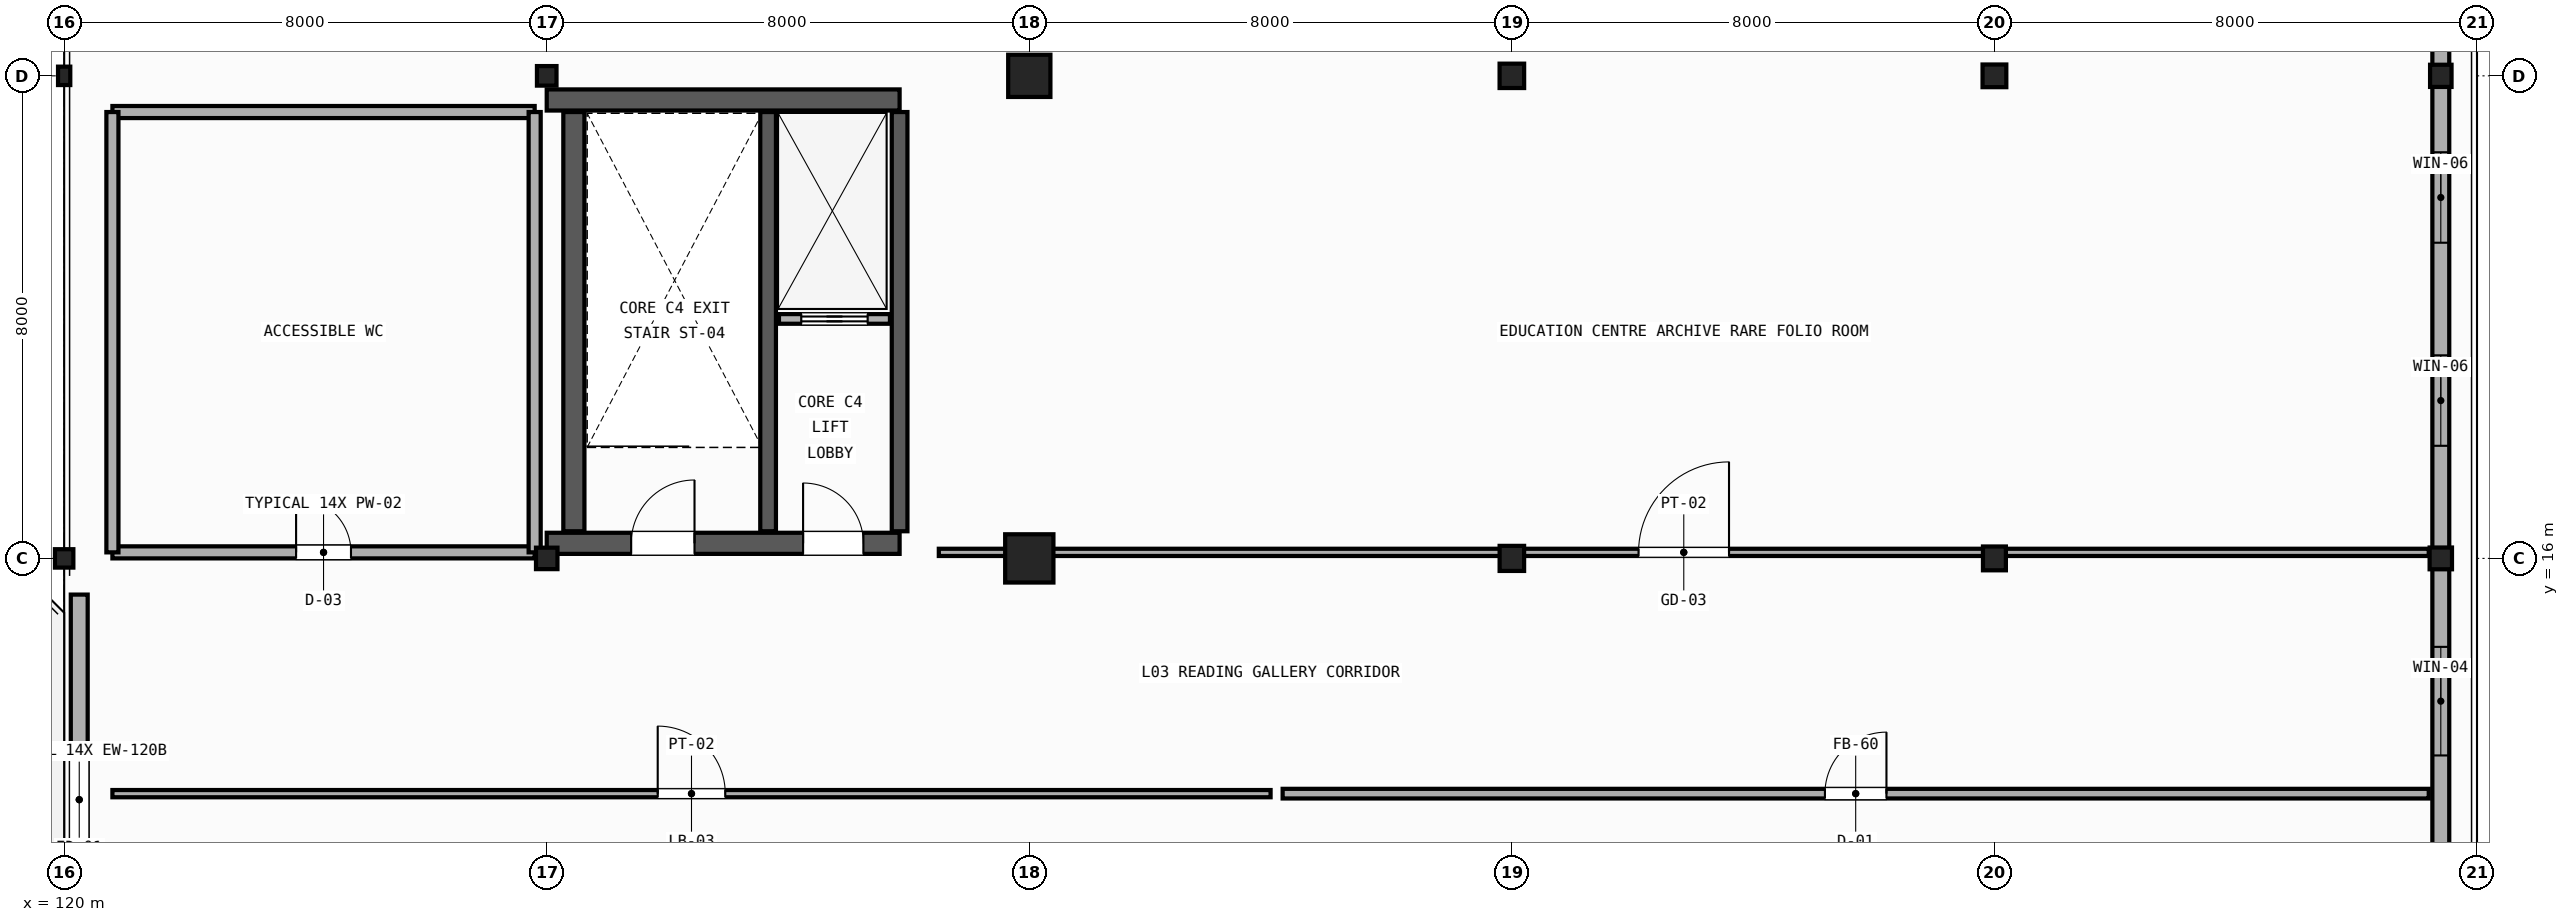
"""IFC4 building model, lengths in metres.
Left out: names, types, materials, properties, quantities, classifications, styles, units other than length and angle.
Written with IfcOpenShell. Run it as: python <this file> out.ifc"""

import sys

from ifc_helpers import new_model, si_unit, direction, frame, frame_2d, origin, origin_2d, place, context, subcontext, project, spatial, rectangle, hollow_rectangle, hollow_circle, i_section, extrude, element, fill, save


model = new_model("IFC4")
c1 = context("Model", 3, precision=1e-05, world=origin(), true_north=direction((0.0, 1.0)))
c2 = subcontext(c1, "Body", "Model", "MODEL_VIEW")
j1 = project(units=[si_unit("LENGTHUNIT", "METRE"), si_unit("PLANEANGLEUNIT", "RADIAN")], contexts=[c1])
p1 = place(None, origin())
s1 = spatial("IfcSite", under=j1, at=p1, CompositionType="ELEMENT")
p2 = place(p1, origin())
s2 = spatial("IfcBuilding", under=s1, at=p2, CompositionType="ELEMENT")
p3 = place(p2, frame((0.0, 0.0, 15.0)))
s3 = spatial("IfcBuildingStorey", under=s2, at=p3, CompositionType="ELEMENT", Elevation=15.0)
p4 = place(p3, frame((120.0, 16.0, 0.0), z_axis=(0.0, 0.0, 1.0), x_axis=(0.0, 1.0, 0.0)))
e1 = element("IfcColumn", 1, at=p4, inside=s3, PredefinedType="COLUMN", context=c2, shape_type="SweptSolid", body=[
    extrude(hollow_rectangle(XDim=0.305, YDim=0.305, WallThickness=0.012, InnerFilletRadius=0.012, OuterFilletRadius=0.024, at=origin_2d()), origin(), (0.0, 0.0, 1.0), 4.8),
])
p5 = place(p3, frame((120.0, 24.0, 0.0), z_axis=(0.0, 0.0, 1.0), x_axis=(1.0, 0.0, 0.0)))
e2 = element("IfcColumn", 2, at=p5, inside=s3, PredefinedType="COLUMN", context=c2, shape_type="SweptSolid", body=[
    extrude(hollow_rectangle(XDim=0.203, YDim=0.305, WallThickness=0.009, InnerFilletRadius=0.009, OuterFilletRadius=0.018, at=origin_2d()), origin(), (0.0, 0.0, 1.0), 4.8),
])
p6 = place(p3, frame((128.0, 16.0, 0.0), z_axis=(0.0, 0.0, 1.0), x_axis=(1.0, 0.0, 0.0)))
e3 = element("IfcColumn", 3, at=p6, inside=s3, PredefinedType="COLUMN", context=c2, shape_type="SweptSolid", body=[
    extrude(hollow_circle(Radius=0.178, WallThickness=0.012, at=origin_2d()), origin(), (0.0, 0.0, 1.0), 7.5),
])
p7 = place(p3, frame((128.0, 24.0, 0.0), z_axis=(0.0, 0.0, 1.0), x_axis=(0.0, 1.0, 0.0)))
e4 = element("IfcColumn", 4, at=p7, inside=s3, PredefinedType="COLUMN", context=c2, shape_type="SweptSolid", body=[
    extrude(hollow_circle(Radius=0.162, WallThickness=0.012, at=origin_2d()), origin(), (0.0, 0.0, 1.0), 4.8),
])
p8 = place(p3, frame((136.0, 16.0, 0.0), z_axis=(0.0, 0.0, 1.0), x_axis=(0.0, 1.0, 0.0)))
e5 = element("IfcColumn", 5, at=p8, inside=s3, PredefinedType="COLUMN", context=c2, shape_type="SweptSolid", body=[
    extrude(rectangle(XDim=0.8, YDim=0.8, at=origin_2d()), origin(), (0.0, 0.0, 1.0), 7.5),
])
p9 = place(p3, frame((136.0, 24.0, 0.0), z_axis=(0.0, 0.0, 1.0), x_axis=(1.0, 0.0, 0.0)))
e6 = element("IfcColumn", 6, at=p9, inside=s3, PredefinedType="COLUMN", context=c2, shape_type="SweptSolid", body=[
    extrude(rectangle(XDim=0.7, YDim=0.7, at=origin_2d()), origin(), (0.0, 0.0, 1.0), 4.8),
])
p10 = place(p3, frame((144.0, 16.0, 0.0), z_axis=(0.0, 0.0, 1.0), x_axis=(1.0, 0.0, 0.0)))
e7 = element("IfcColumn", 7, at=p10, inside=s3, PredefinedType="COLUMN", context=c2, shape_type="SweptSolid", body=[
    extrude(i_section(OverallWidth=0.406, OverallDepth=0.416, WebThickness=0.03, FlangeThickness=0.048, FilletRadius=0.015, at=origin_2d()), origin(), (0.0, 0.0, 1.0), 7.5),
])
p11 = place(p3, frame((144.0, 24.0, 0.0), z_axis=(0.0, 0.0, 1.0), x_axis=(0.0, 1.0, 0.0)))
e8 = element("IfcColumn", 8, at=p11, inside=s3, PredefinedType="COLUMN", context=c2, shape_type="SweptSolid", body=[
    extrude(i_section(OverallWidth=0.404, OverallDepth=0.407, WebThickness=0.027, FlangeThickness=0.044, FilletRadius=0.015, at=origin_2d()), origin(), (0.0, 0.0, 1.0), 4.8),
])
p12 = place(p3, frame((152.0, 16.0, 0.0), z_axis=(0.0, 0.0, 1.0), x_axis=(0.0, 1.0, 0.0)))
e9 = element("IfcColumn", 9, at=p12, inside=s3, PredefinedType="COLUMN", context=c2, shape_type="SweptSolid", body=[
    extrude(i_section(OverallWidth=0.395, OverallDepth=0.38, WebThickness=0.019, FlangeThickness=0.03, FilletRadius=0.015, at=origin_2d()), origin(), (0.0, 0.0, 1.0), 4.8),
])
p13 = place(p3, frame((152.0, 24.0, 0.0), z_axis=(0.0, 0.0, 1.0), x_axis=(1.0, 0.0, 0.0)))
e10 = element("IfcColumn", 10, at=p13, inside=s3, PredefinedType="COLUMN", context=c2, shape_type="SweptSolid", body=[
    extrude(i_section(OverallWidth=0.394, OverallDepth=0.376, WebThickness=0.017, FlangeThickness=0.028, FilletRadius=0.015, at=origin_2d()), origin(), (0.0, 0.0, 1.0), 4.8),
])
p14 = place(p3, frame((159.4, 16.0, 0.0), z_axis=(0.0, 0.0, 1.0), x_axis=(1.0, 0.0, 0.0)))
e11 = element("IfcColumn", 11, at=p14, inside=s3, PredefinedType="COLUMN", context=c2, shape_type="SweptSolid", body=[
    extrude(i_section(OverallWidth=0.371, OverallDepth=0.361, WebThickness=0.012, FlangeThickness=0.02, FilletRadius=0.015, at=origin_2d()), origin(), (0.0, 0.0, 1.0), 4.8),
])
p15 = place(p3, frame((159.4, 24.0, 0.0), z_axis=(0.0, 0.0, 1.0), x_axis=(0.0, 1.0, 0.0)))
e12 = element("IfcColumn", 12, at=p15, inside=s3, PredefinedType="COLUMN", context=c2, shape_type="SweptSolid", body=[
    extrude(i_section(OverallWidth=0.368, OverallDepth=0.356, WebThickness=0.011, FlangeThickness=0.018, FilletRadius=0.015, at=origin_2d()), origin(), (0.0, 0.0, 1.0), 4.8),
])
p16 = place(p3, frame((120.25, 8.6, 0.0), z_axis=(0.0, 0.0, 1.0), x_axis=(0.0, 1.0, 0.0)))
e13 = element("IfcWall", 13, at=p16, inside=s3, PredefinedType="STANDARD", context=c2, shape_type="SweptSolid", body=[
    extrude(rectangle(XDim=6.8, YDim=0.28, at=frame_2d((3.4, 0.0))), origin(), (0.0, 0.0, 1.0), 4.4),
])
p17 = place(p16, frame((2.6, 0.0, 0.0)))
e14 = element("IfcOpeningElement", 14, at=p17, cuts=e13, PredefinedType="OPENING", context=c2, shape_type="SweptSolid", body=[
    extrude(rectangle(XDim=1.6, YDim=2.25, at=frame_2d((0.8, 1.125))), frame((0.0, 0.15, 0.0), z_axis=(0.0, -1.0, 0.0), x_axis=(1.0, 0.0, 0.0)), (0.0, 0.0, 1.0), 0.3),
])
p18 = place(p3, frame((159.4, 8.0, 0.0), z_axis=(0.0, 0.0, 1.0), x_axis=(0.0, 1.0, 0.0)))
e15 = element("IfcWall", 15, at=p18, inside=s3, PredefinedType="STANDARD", context=c2, shape_type="SweptSolid", body=[
    extrude(rectangle(XDim=8.0, YDim=0.28, at=frame_2d((4.0, 0.0))), origin(), (0.0, 0.0, 1.0), 4.5),
])
p19 = place(p18, frame((1.467, 0.0, 0.9)))
e16 = element("IfcOpeningElement", 16, at=p19, cuts=e15, PredefinedType="OPENING", context=c2, shape_type="SweptSolid", body=[
    extrude(rectangle(XDim=1.8, YDim=2.5, at=frame_2d((0.9, 1.25))), frame((0.0, 0.15, 0.0), z_axis=(0.0, -1.0, 0.0), x_axis=(1.0, 0.0, 0.0)), (0.0, 0.0, 1.0), 0.3),
])
p20 = place(p18, frame((4.733, 0.0, 0.9)))
e17 = element("IfcOpeningElement", 17, at=p20, cuts=e15, PredefinedType="OPENING", context=c2, shape_type="SweptSolid", body=[
    extrude(rectangle(XDim=1.8, YDim=2.5, at=frame_2d((0.9, 1.25))), frame((0.0, 0.15, 0.0), z_axis=(0.0, -1.0, 0.0), x_axis=(1.0, 0.0, 0.0)), (0.0, 0.0, 1.0), 0.3),
])
p21 = place(p3, frame((159.4, 16.0, 0.0), z_axis=(0.0, 0.0, 1.0), x_axis=(0.0, 1.0, 0.0)))
e18 = element("IfcWall", 18, at=p21, inside=s3, PredefinedType="STANDARD", context=c2, shape_type="SweptSolid", body=[
    extrude(rectangle(XDim=8.6, YDim=0.28, at=frame_2d((4.3, 0.0))), origin(), (0.0, 0.0, 1.0), 4.047),
])
p22 = place(p21, frame((1.867, 0.0, 0.95)))
e19 = element("IfcOpeningElement", 19, at=p22, cuts=e18, PredefinedType="OPENING", context=c2, shape_type="SweptSolid", body=[
    extrude(rectangle(XDim=1.5, YDim=2.2, at=frame_2d((0.75, 1.1))), frame((0.0, 0.15, 0.0), z_axis=(0.0, -1.0, 0.0), x_axis=(1.0, 0.0, 0.0)), (0.0, 0.0, 1.0), 0.3),
])
p23 = place(p21, frame((5.233, 0.0, 0.95)))
e20 = element("IfcOpeningElement", 20, at=p23, cuts=e18, PredefinedType="OPENING", context=c2, shape_type="SweptSolid", body=[
    extrude(rectangle(XDim=1.5, YDim=2.2, at=frame_2d((0.75, 1.1))), frame((0.0, 0.15, 0.0), z_axis=(0.0, -1.0, 0.0), x_axis=(1.0, 0.0, 0.0)), (0.0, 0.0, 1.0), 0.3),
])
p24 = place(p3, frame((128.0, 16.25, 0.0), z_axis=(0.0, 0.0, 1.0), x_axis=(1.0, 0.0, 0.0)))
e21 = element("IfcWall", 21, at=p24, inside=s3, PredefinedType="SHEAR", context=c2, shape_type="SweptSolid", body=[
    extrude(rectangle(XDim=5.85, YDim=0.35, at=frame_2d((2.925, 0.0))), origin(), (0.0, 0.0, 1.0), 4.3),
])
p25 = place(p24, frame((1.4, 0.0, 0.0)))
e22 = element("IfcOpeningElement", 22, at=p25, cuts=e21, PredefinedType="OPENING", context=c2, shape_type="SweptSolid", body=[
    extrude(rectangle(XDim=1.05, YDim=2.1, at=frame_2d((0.525, 1.05))), frame((0.0, 0.185, 0.0), z_axis=(0.0, -1.0, 0.0), x_axis=(1.0, 0.0, 0.0)), (0.0, 0.0, 1.0), 0.37),
])
p26 = place(p24, frame((4.25, 0.0, 0.0)))
e23 = element("IfcOpeningElement", 23, at=p26, cuts=e21, PredefinedType="OPENING", context=c2, shape_type="SweptSolid", body=[
    extrude(rectangle(XDim=1.0, YDim=2.15, at=frame_2d((0.5, 1.075))), frame((0.0, 0.185, 0.0), z_axis=(0.0, -1.0, 0.0), x_axis=(1.0, 0.0, 0.0)), (0.0, 0.0, 1.0), 0.37),
])
p27 = place(p3, frame((128.0, 23.6, 0.0), z_axis=(0.0, 0.0, 1.0), x_axis=(1.0, 0.0, 0.0)))
e24 = element("IfcWall", 24, at=p27, inside=s3, PredefinedType="SHEAR", context=c2, shape_type="SweptSolid", body=[
    extrude(rectangle(XDim=5.85, YDim=0.35, at=frame_2d((2.925, 0.0))), origin(), (0.0, 0.0, 1.0), 4.3),
])
p28 = place(p3, frame((128.45, 16.45, 0.0), z_axis=(0.0, 0.0, 1.0), x_axis=(0.0, 1.0, 0.0)))
e25 = element("IfcWall", 25, at=p28, inside=s3, PredefinedType="SHEAR", context=c2, shape_type="SweptSolid", body=[
    extrude(rectangle(XDim=6.95, YDim=0.35, at=frame_2d((3.475, 0.0))), origin(), (0.0, 0.0, 1.0), 4.3),
])
for number, where, z_axis, x_axis in (
    (26, (133.85, 16.45, 0.0), (0.0, 0.0, 1.0), (0.0, 1.0, 0.0)),
    (27, (131.67, 16.45, 0.0), (0.0, 0.0, 1.0), (0.0, 1.0, 0.0)),
):
    element("IfcWall", number, at=place(p3, frame(where, z_axis=z_axis, x_axis=x_axis)), inside=s3, PredefinedType="SHEAR", context=c2, shape_type="SweptSolid", body=[
        extrude(rectangle(XDim=6.95, YDim=0.26, at=frame_2d((3.475, 0.0))), origin(), (0.0, 0.0, 1.0), 4.3),
    ])
p29 = place(p3, frame((131.85, 19.97, 0.0), z_axis=(0.0, 0.0, 1.0), x_axis=(1.0, 0.0, 0.0)))
e28 = element("IfcWall", 28, at=p29, inside=s3, PredefinedType="PARTITIONING", context=c2, shape_type="SweptSolid", body=[
    extrude(rectangle(XDim=1.84, YDim=0.16, at=frame_2d((0.92, 0.0))), origin(), (0.0, 0.0, 1.0), 3.6),
])
p30 = place(p29, frame((0.37, 0.0, 0.0)))
e29 = element("IfcOpeningElement", 29, at=p30, cuts=e28, PredefinedType="OPENING", context=c2, shape_type="SweptSolid", body=[
    extrude(rectangle(XDim=1.1, YDim=2.15, at=frame_2d((0.55, 1.075))), frame((0.0, 0.09, 0.0), z_axis=(0.0, -1.0, 0.0), x_axis=(1.0, 0.0, 0.0)), (0.0, 0.0, 1.0), 0.18),
])
p31 = place(p3, frame((120.8, 12.1, 0.0), z_axis=(0.0, 0.0, 1.0), x_axis=(1.0, 0.0, 0.0)))
e30 = element("IfcWall", 30, at=p31, inside=s3, PredefinedType="PARTITIONING", context=c2, shape_type="SweptSolid", body=[
    extrude(rectangle(XDim=19.2, YDim=0.12, at=frame_2d((9.6, 0.0))), origin(), (0.0, 0.0, 1.0), 4.29),
])
p32 = place(p31, frame((9.04, 0.0, 0.0)))
e31 = element("IfcOpeningElement", 31, at=p32, cuts=e30, PredefinedType="OPENING", context=c2, shape_type="SweptSolid", body=[
    extrude(rectangle(XDim=1.12, YDim=2.15, at=frame_2d((0.56, 1.075))), frame((0.0, 0.07, 0.0), z_axis=(0.0, -1.0, 0.0), x_axis=(1.0, 0.0, 0.0)), (0.0, 0.0, 1.0), 0.14),
])
p33 = place(p3, frame((140.2, 12.1, 0.0), z_axis=(0.0, 0.0, 1.0), x_axis=(1.0, 0.0, 0.0)))
e32 = element("IfcWall", 32, at=p33, inside=s3, PredefinedType="PARTITIONING", context=c2, shape_type="SweptSolid", body=[
    extrude(rectangle(XDim=19.0, YDim=0.16, at=frame_2d((9.5, 0.0))), origin(), (0.0, 0.0, 1.0), 4.29),
])
p34 = place(p33, frame((8.99, 0.0, 0.0)))
e33 = element("IfcOpeningElement", 33, at=p34, cuts=e32, PredefinedType="OPENING", context=c2, shape_type="SweptSolid", body=[
    extrude(rectangle(XDim=1.02, YDim=2.15, at=frame_2d((0.51, 1.075))), frame((0.0, 0.09, 0.0), z_axis=(0.0, -1.0, 0.0), x_axis=(1.0, 0.0, 0.0)), (0.0, 0.0, 1.0), 0.18),
])
p35 = place(p3, frame((120.8, 16.1, 0.0), z_axis=(0.0, 0.0, 1.0), x_axis=(1.0, 0.0, 0.0)))
e34 = element("IfcWall", 34, at=p35, inside=s3, PredefinedType="PLUMBINGWALL", context=c2, shape_type="SweptSolid", body=[
    extrude(rectangle(XDim=7.0, YDim=0.2, at=frame_2d((3.5, 0.0))), origin(), (0.0, 0.0, 1.0), 4.29),
])
p36 = place(p35, frame((3.045, 0.0, 0.0)))
e35 = element("IfcOpeningElement", 35, at=p36, cuts=e34, PredefinedType="OPENING", context=c2, shape_type="SweptSolid", body=[
    extrude(rectangle(XDim=0.91, YDim=2.1, at=frame_2d((0.455, 1.05))), frame((0.0, 0.11, 0.0), z_axis=(0.0, -1.0, 0.0), x_axis=(1.0, 0.0, 0.0)), (0.0, 0.0, 1.0), 0.22),
])
p37 = place(p3, frame((120.8, 23.4, 0.0), z_axis=(0.0, 0.0, 1.0), x_axis=(1.0, 0.0, 0.0)))
e36 = element("IfcWall", 36, at=p37, inside=s3, PredefinedType="PLUMBINGWALL", context=c2, shape_type="SweptSolid", body=[
    extrude(rectangle(XDim=7.0, YDim=0.2, at=frame_2d((3.5, 0.0))), origin(), (0.0, 0.0, 1.0), 4.29),
])
for number, where, z_axis, x_axis in (
    (37, (120.8, 16.1, 0.0), (0.0, 0.0, 1.0), (0.0, 1.0, 0.0)),
    (38, (127.8, 16.1, 0.0), (0.0, 0.0, 1.0), (0.0, 1.0, 0.0)),
):
    element("IfcWall", number, at=place(p3, frame(where, z_axis=z_axis, x_axis=x_axis)), inside=s3, PredefinedType="PLUMBINGWALL", context=c2, shape_type="SweptSolid", body=[
        extrude(rectangle(XDim=7.3, YDim=0.2, at=frame_2d((3.65, 0.0))), origin(), (0.0, 0.0, 1.0), 4.29),
    ])
p38 = place(p3, frame((134.5, 16.1, 0.0), z_axis=(0.0, 0.0, 1.0), x_axis=(1.0, 0.0, 0.0)))
e39 = element("IfcWall", 39, at=p38, inside=s3, PredefinedType="PARTITIONING", context=c2, shape_type="SweptSolid", body=[
    extrude(rectangle(XDim=24.7, YDim=0.12, at=frame_2d((12.35, 0.0))), origin(), (0.0, 0.0, 1.0), 4.29),
])
p39 = place(p38, frame((11.6, 0.0, 0.0)))
e40 = element("IfcOpeningElement", 40, at=p39, cuts=e39, PredefinedType="OPENING", context=c2, shape_type="SweptSolid", body=[
    extrude(rectangle(XDim=1.5, YDim=2.3, at=frame_2d((0.75, 1.15))), frame((0.0, 0.07, 0.0), z_axis=(0.0, -1.0, 0.0), x_axis=(1.0, 0.0, 0.0)), (0.0, 0.0, 1.0), 0.14),
])
p40 = place(p17, origin())
e41 = element("IfcDoor", 41, at=p40, inside=s3, OperationType="SINGLE_SWING_LEFT", PredefinedType="DOOR", context=c2, shape_type="SweptSolid", body=[
    extrude(rectangle(XDim=1.6, YDim=2.25, at=frame_2d((0.8, 1.125))), frame((0.0, 0.025, 0.0), z_axis=(0.0, -1.0, 0.0), x_axis=(1.0, 0.0, 0.0)), (0.0, 0.0, 1.0), 0.05),
])
fill(e14, e41)
p41 = place(p20, origin())
e42 = element("IfcWindow", 42, at=p41, inside=s3, PartitioningType="SINGLE_PANEL", PredefinedType="WINDOW", context=c2, shape_type="SweptSolid", body=[
    extrude(rectangle(XDim=1.8, YDim=2.5, at=frame_2d((0.9, 1.25))), frame((0.0, 0.03, 0.0), z_axis=(0.0, -1.0, 0.0), x_axis=(1.0, 0.0, 0.0)), (0.0, 0.0, 1.0), 0.06),
])
fill(e17, e42)
p42 = place(p22, origin())
e43 = element("IfcWindow", 43, at=p42, inside=s3, PartitioningType="SINGLE_PANEL", PredefinedType="WINDOW", context=c2, shape_type="SweptSolid", body=[
    extrude(rectangle(XDim=1.5, YDim=2.2, at=frame_2d((0.75, 1.1))), frame((0.0, 0.03, 0.0), z_axis=(0.0, -1.0, 0.0), x_axis=(1.0, 0.0, 0.0)), (0.0, 0.0, 1.0), 0.06),
])
fill(e19, e43)
p43 = place(p23, origin())
e44 = element("IfcWindow", 44, at=p43, inside=s3, PartitioningType="SINGLE_PANEL", PredefinedType="WINDOW", context=c2, shape_type="SweptSolid", body=[
    extrude(rectangle(XDim=1.5, YDim=2.2, at=frame_2d((0.75, 1.1))), frame((0.0, 0.03, 0.0), z_axis=(0.0, -1.0, 0.0), x_axis=(1.0, 0.0, 0.0)), (0.0, 0.0, 1.0), 0.06),
])
fill(e20, e44)
p44 = place(p30, origin())
e45 = element("IfcDoor", 45, at=p44, inside=s3, OperationType="SLIDING_TO_LEFT", PredefinedType="DOOR", context=c2, shape_type="SweptSolid", body=[
    extrude(rectangle(XDim=1.1, YDim=2.15, at=frame_2d((0.55, 1.075))), frame((0.0, 0.025, 0.0), z_axis=(0.0, -1.0, 0.0), x_axis=(1.0, 0.0, 0.0)), (0.0, 0.0, 1.0), 0.05),
])
fill(e29, e45)
p45 = place(p25, origin())
e46 = element("IfcDoor", 46, at=p45, inside=s3, OperationType="SINGLE_SWING_RIGHT", PredefinedType="DOOR", context=c2, shape_type="SweptSolid", body=[
    extrude(rectangle(XDim=1.05, YDim=2.1, at=frame_2d((0.525, 1.05))), frame((0.0, 0.025, 0.0), z_axis=(0.0, -1.0, 0.0), x_axis=(1.0, 0.0, 0.0)), (0.0, 0.0, 1.0), 0.05),
])
fill(e22, e46)
p46 = place(p26, origin())
e47 = element("IfcDoor", 47, at=p46, inside=s3, OperationType="SINGLE_SWING_LEFT", PredefinedType="DOOR", context=c2, shape_type="SweptSolid", body=[
    extrude(rectangle(XDim=1.0, YDim=2.15, at=frame_2d((0.5, 1.075))), frame((0.0, 0.025, 0.0), z_axis=(0.0, -1.0, 0.0), x_axis=(1.0, 0.0, 0.0)), (0.0, 0.0, 1.0), 0.05),
])
fill(e23, e47)
p47 = place(p32, origin())
e48 = element("IfcDoor", 48, at=p47, inside=s3, OperationType="SINGLE_SWING_LEFT", PredefinedType="DOOR", context=c2, shape_type="SweptSolid", body=[
    extrude(rectangle(XDim=1.12, YDim=2.15, at=frame_2d((0.56, 1.075))), frame((0.0, 0.025, 0.0), z_axis=(0.0, -1.0, 0.0), x_axis=(1.0, 0.0, 0.0)), (0.0, 0.0, 1.0), 0.05),
])
fill(e31, e48)
p48 = place(p34, origin())
e49 = element("IfcDoor", 49, at=p48, inside=s3, OperationType="SINGLE_SWING_RIGHT", PredefinedType="DOOR", context=c2, shape_type="SweptSolid", body=[
    extrude(rectangle(XDim=1.02, YDim=2.15, at=frame_2d((0.51, 1.075))), frame((0.0, 0.025, 0.0), z_axis=(0.0, -1.0, 0.0), x_axis=(1.0, 0.0, 0.0)), (0.0, 0.0, 1.0), 0.05),
])
fill(e33, e49)
p49 = place(p36, origin())
e50 = element("IfcDoor", 50, at=p49, inside=s3, OperationType="SINGLE_SWING_LEFT", PredefinedType="DOOR", context=c2, shape_type="SweptSolid", body=[
    extrude(rectangle(XDim=0.91, YDim=2.1, at=frame_2d((0.455, 1.05))), frame((0.0, 0.025, 0.0), z_axis=(0.0, -1.0, 0.0), x_axis=(1.0, 0.0, 0.0)), (0.0, 0.0, 1.0), 0.05),
])
fill(e35, e50)
p50 = place(p39, origin())
e51 = element("IfcDoor", 51, at=p50, inside=s3, OperationType="SINGLE_SWING_RIGHT", PredefinedType="DOOR", context=c2, shape_type="SweptSolid", body=[
    extrude(rectangle(XDim=1.5, YDim=2.3, at=frame_2d((0.75, 1.15))), frame((0.0, 0.025, 0.0), z_axis=(0.0, -1.0, 0.0), x_axis=(1.0, 0.0, 0.0)), (0.0, 0.0, 1.0), 0.05),
])
fill(e40, e51)
save(model, sys.argv[1])
